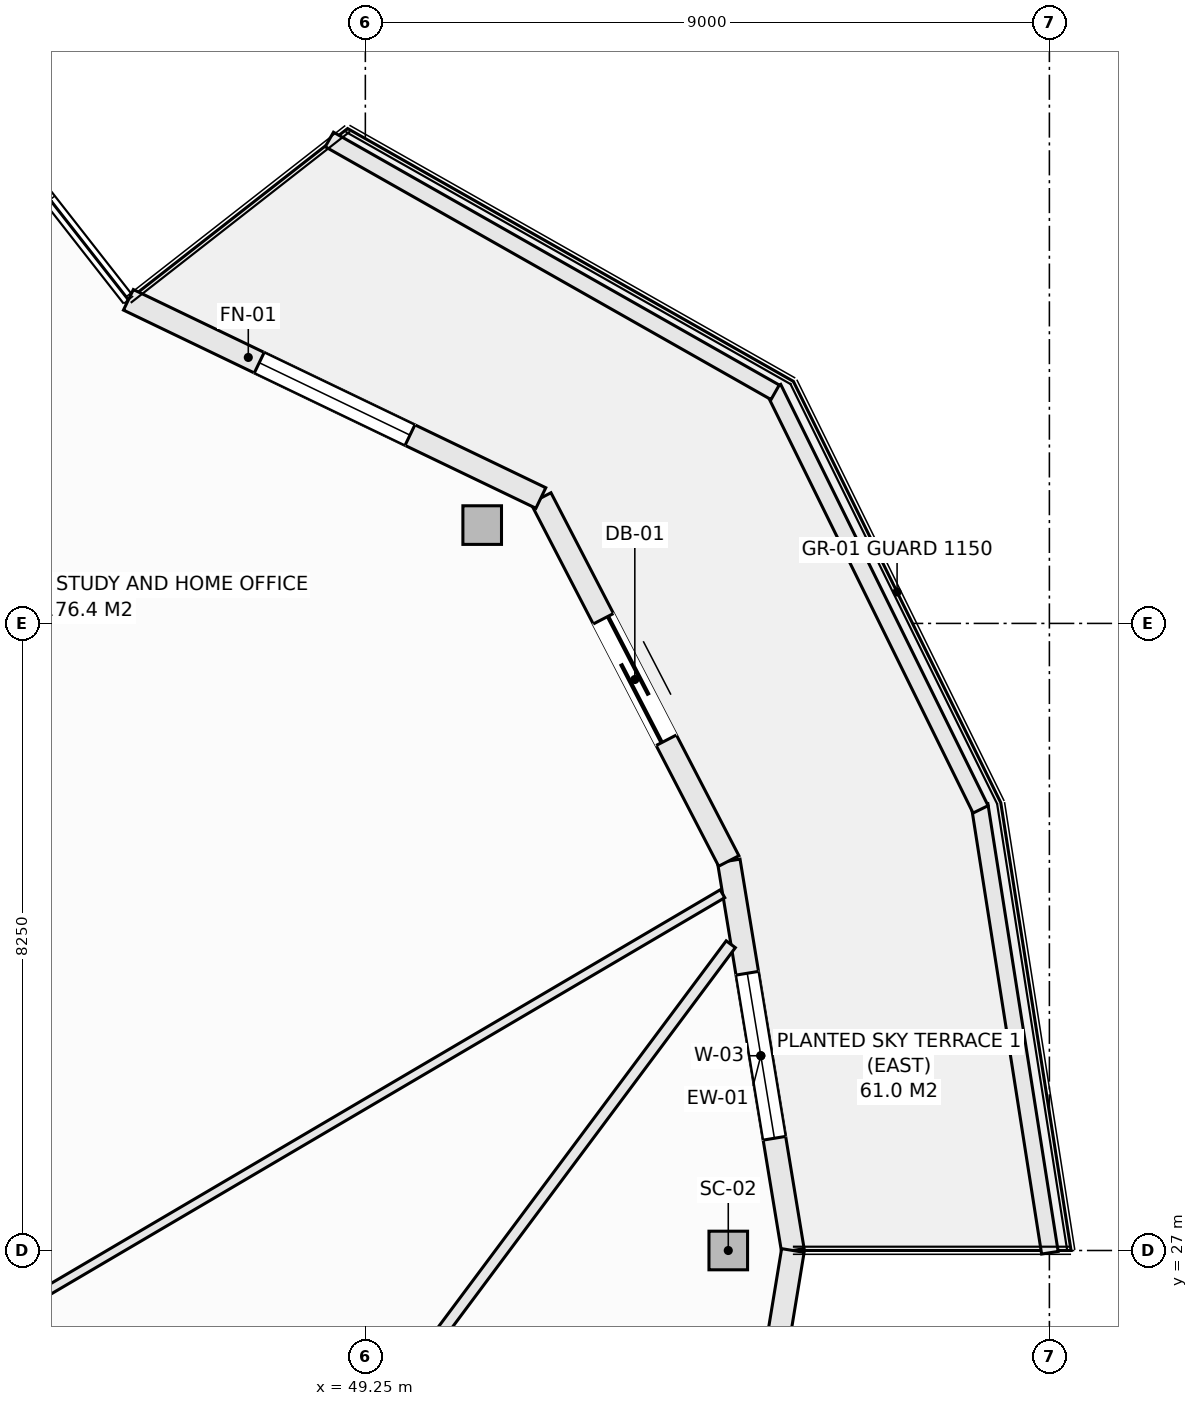
"""IFC4 building model, lengths in metres.
Left out: names, types, materials, properties, quantities, classifications, styles, units other than length and angle.
Written with IfcOpenShell. Run it as: python <this file> out.ifc"""

import sys

from ifc_helpers import new_model, si_unit, direction, frame, frame_2d, origin, origin_2d, place, context, subcontext, project, spatial, rectangle, hollow_rectangle, extrude, element, fill, save


model = new_model("IFC4")
c1 = context("Model", 3, precision=1e-05, world=origin(), true_north=direction((0.0, 1.0)))
c2 = subcontext(c1, "Body", "Model", "MODEL_VIEW")
j1 = project(units=[si_unit("LENGTHUNIT", "METRE"), si_unit("PLANEANGLEUNIT", "RADIAN")], contexts=[c1])
p1 = place(None, origin())
s1 = spatial("IfcSite", under=j1, at=p1, CompositionType="ELEMENT")
p2 = place(p1, origin())
s2 = spatial("IfcBuilding", under=s1, at=p2, CompositionType="ELEMENT")
p3 = place(p2, frame((0.0, 0.0, 199.7)))
s3 = spatial("IfcBuildingStorey", under=s2, at=p3, CompositionType="ELEMENT", Elevation=199.7)
for number, where, z_axis, x_axis in (
    (1, (54.025, 27.0, -0.27), (0.0, 0.0, 1.0), (1.0, 0.0, 0.0)),
    (2, (50.787, 36.544, -0.27), (0.0, 0.0, 1.0), (1.0, 0.0, 0.0)),
):
    element("IfcColumn", number, at=place(p3, frame(where, z_axis=z_axis, x_axis=x_axis)), inside=s3, PredefinedType="COLUMN", context=c2, shape_type="SweptSolid", body=[
        extrude(hollow_rectangle(XDim=0.508, YDim=0.508, WallThickness=0.019, at=origin_2d()), origin(), (0.0, 0.0, 1.0), 3.3),
    ])
p4 = place(p3, frame((54.032, 32.125, 0.0), z_axis=(0.0, 0.0, 1.0), x_axis=(0.16237087798, -0.986729799886, 0.0)))
e3 = element("IfcWall", 3, at=p4, inside=s3, PredefinedType="SOLIDWALL", context=c2, shape_type="SweptSolid", body=[
    extrude(rectangle(XDim=5.193, YDim=0.3, at=frame_2d((2.597, 0.0))), origin(), (0.0, 0.0, 1.0), 2.605),
])
p5 = place(p4, frame((1.497, 0.0, 0.72)))
e4 = element("IfcOpeningElement", 4, at=p5, cuts=e3, PredefinedType="OPENING", context=c2, shape_type="SweptSolid", body=[
    extrude(rectangle(XDim=2.2, YDim=1.65, at=frame_2d((1.1, 0.825))), frame((0.0, 0.16, 0.0), z_axis=(0.0, -1.0, 0.0), x_axis=(1.0, 0.0, 0.0)), (0.0, 0.0, 1.0), 0.32),
])
p6 = place(p3, frame((51.559, 36.9, 0.0), z_axis=(0.0, 0.0, 1.0), x_axis=(0.459808219482, -0.888018243786, 0.0)))
e5 = element("IfcWall", 5, at=p6, inside=s3, PredefinedType="SOLIDWALL", context=c2, shape_type="SweptSolid", body=[
    extrude(rectangle(XDim=5.378, YDim=0.3, at=frame_2d((2.689, 0.0))), origin(), (0.0, 0.0, 1.0), 2.605),
])
p7 = place(p6, frame((1.789, 0.0, 0.0)))
e6 = element("IfcOpeningElement", 6, at=p7, cuts=e5, PredefinedType="OPENING", context=c2, shape_type="SweptSolid", body=[
    extrude(rectangle(XDim=1.8, YDim=2.25, at=frame_2d((0.9, 1.125))), frame((0.0, 0.16, 0.0), z_axis=(0.0, -1.0, 0.0), x_axis=(1.0, 0.0, 0.0)), (0.0, 0.0, 1.0), 0.32),
])
p8 = place(p3, frame((46.133, 39.507, 0.0), z_axis=(0.0, 0.0, 1.0), x_axis=(0.901348331142, -0.433094892545, 0.0)))
e7 = element("IfcWall", 7, at=p8, inside=s3, PredefinedType="SOLIDWALL", context=c2, shape_type="SweptSolid", body=[
    extrude(rectangle(XDim=6.021, YDim=0.3, at=frame_2d((3.01, 0.0))), origin(), (0.0, 0.0, 1.0), 2.605),
])
p9 = place(p8, frame((1.91, 0.0, 0.72)))
e8 = element("IfcOpeningElement", 8, at=p9, cuts=e7, PredefinedType="OPENING", context=c2, shape_type="SweptSolid", body=[
    extrude(rectangle(XDim=2.2, YDim=1.65, at=frame_2d((1.1, 0.825))), frame((0.0, 0.16, 0.0), z_axis=(0.0, -1.0, 0.0), x_axis=(1.0, 0.0, 0.0)), (0.0, 0.0, 1.0), 0.32),
])
p10 = place(p3, frame((54.032, 21.875, 0.0), z_axis=(0.0, 0.0, 1.0), x_axis=(0.16237087798, 0.986729799886, 0.0)))
e9 = element("IfcWall", 9, at=p10, inside=s3, PredefinedType="SOLIDWALL", context=c2, shape_type="SweptSolid", body=[
    extrude(rectangle(XDim=5.193, YDim=0.3, at=frame_2d((2.597, 0.0))), origin(), (0.0, 0.0, 1.0), 2.605),
])
p11 = place(p10, frame((1.497, 0.0, 0.72)))
e10 = element("IfcOpeningElement", 10, at=p11, cuts=e9, PredefinedType="OPENING", context=c2, shape_type="SweptSolid", body=[
    extrude(rectangle(XDim=2.2, YDim=1.65, at=frame_2d((1.1, 0.825))), frame((0.0, 0.16, 0.0), z_axis=(0.0, -1.0, 0.0), x_axis=(1.0, 0.0, 0.0)), (0.0, 0.0, 1.0), 0.32),
])
p12 = place(p3, frame((57.332, 32.862, 0.0), z_axis=(0.0, 0.0, 1.0), x_axis=(0.1550711793, -0.987903299595, 0.0)))
e11 = element("IfcWall", 11, at=p12, inside=s3, PredefinedType="PARAPET", context=c2, shape_type="SweptSolid", body=[
    extrude(rectangle(XDim=5.964, YDim=0.22, at=frame_2d((2.982, 0.0))), origin(), (0.0, 0.0, 1.0), 0.52),
])
p13 = place(p3, frame((54.616, 38.347, 0.0), z_axis=(0.0, 0.0, 1.0), x_axis=(0.441640961804, -0.897191875162, 0.0)))
e12 = element("IfcWall", 12, at=p13, inside=s3, PredefinedType="PARAPET", context=c2, shape_type="SweptSolid", body=[
    extrude(rectangle(XDim=6.178, YDim=0.22, at=frame_2d((3.089, 0.0))), origin(), (0.0, 0.0, 1.0), 0.52),
])
p14 = place(p3, frame((48.776, 41.617, 0.0), z_axis=(0.0, 0.0, 1.0), x_axis=(0.869860619267, -0.493297580623, 0.0)))
e13 = element("IfcWall", 13, at=p14, inside=s3, PredefinedType="PARAPET", context=c2, shape_type="SweptSolid", body=[
    extrude(rectangle(XDim=6.743, YDim=0.22, at=frame_2d((3.371, 0.0))), origin(), (0.0, 0.0, 1.0), 0.52),
])
p15 = place(p3, frame((41.582, 24.419, 0.0), z_axis=(0.0, 0.0, 1.0), x_axis=(0.861940776748, 0.507008971694, 0.0)))
e14 = element("IfcWall", 14, at=p15, inside=s3, PredefinedType="PARTITIONING", context=c2, shape_type="SweptSolid", body=[
    extrude(rectangle(XDim=14.347, YDim=0.12, at=frame_2d((7.174, 0.0))), origin(), (0.0, 0.0, 1.0), 2.478),
])
p16 = place(p3, frame((44.684, 18.457, 0.0), z_axis=(0.0, 0.0, 1.0), x_axis=(0.597750794318, 0.801681974284, 0.0)))
e15 = element("IfcWall", 15, at=p16, inside=s3, PredefinedType="PARTITIONING", context=c2, shape_type="SweptSolid", body=[
    extrude(rectangle(XDim=15.682, YDim=0.15, at=frame_2d((7.841, 0.0))), origin(), (0.0, 0.0, 1.0), 3.03),
])
p17 = place(p5, origin())
e16 = element("IfcWindow", 16, at=p17, inside=s3, PartitioningType="SINGLE_PANEL", PredefinedType="WINDOW", context=c2, shape_type="SweptSolid", body=[
    extrude(rectangle(XDim=2.2, YDim=1.65, at=frame_2d((1.1, 0.825))), frame((0.0, 0.03, 0.0), z_axis=(0.0, -1.0, 0.0), x_axis=(1.0, 0.0, 0.0)), (0.0, 0.0, 1.0), 0.06),
])
fill(e4, e16)
p18 = place(p7, origin())
e17 = element("IfcDoor", 17, at=p18, inside=s3, OperationType="SLIDING_TO_LEFT", PredefinedType="DOOR", context=c2, shape_type="SweptSolid", body=[
    extrude(rectangle(XDim=1.8, YDim=2.25, at=frame_2d((0.9, 1.125))), frame((0.0, 0.025, 0.0), z_axis=(0.0, -1.0, 0.0), x_axis=(1.0, 0.0, 0.0)), (0.0, 0.0, 1.0), 0.05),
])
fill(e6, e17)
p19 = place(p9, origin())
e18 = element("IfcWindow", 18, at=p19, inside=s3, PartitioningType="SINGLE_PANEL", PredefinedType="WINDOW", context=c2, shape_type="SweptSolid", body=[
    extrude(rectangle(XDim=2.2, YDim=1.65, at=frame_2d((1.1, 0.825))), frame((0.0, 0.03, 0.0), z_axis=(0.0, -1.0, 0.0), x_axis=(1.0, 0.0, 0.0)), (0.0, 0.0, 1.0), 0.06),
])
fill(e8, e18)
save(model, sys.argv[1])
